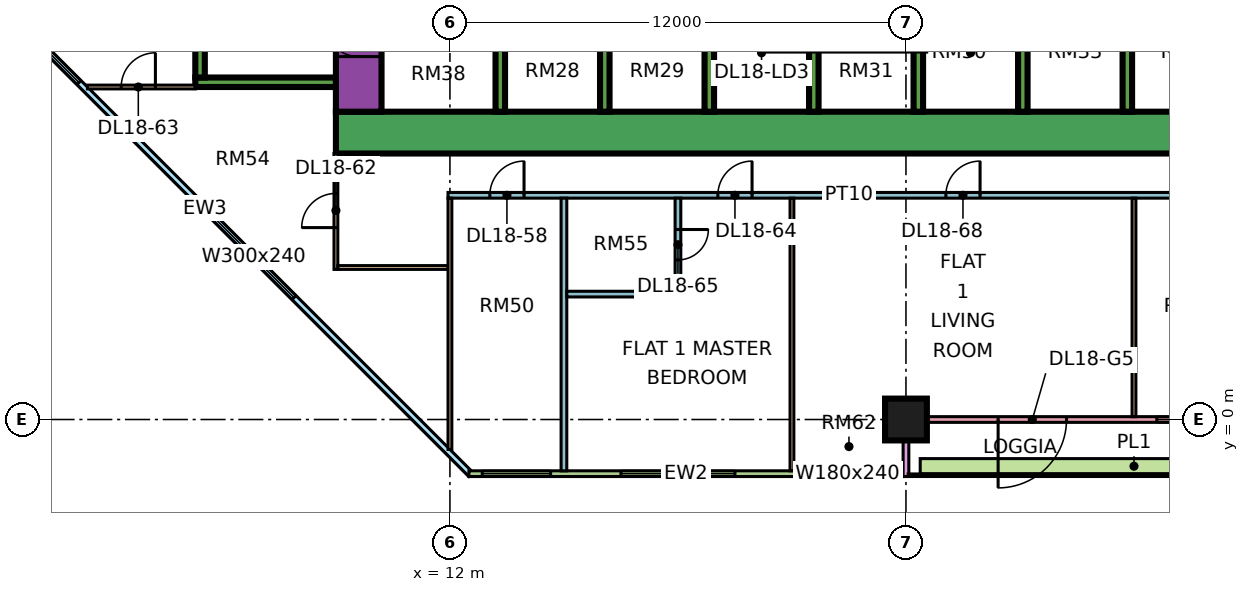
"""IFC4 building model, lengths in metres.
Left out: names, types, materials, properties, quantities, classifications, styles, units other than length and angle.
Written with IfcOpenShell. Run it as: python <this file> out.ifc"""

import sys

from ifc_helpers import new_model, si_unit, direction, frame, frame_2d, origin, origin_2d, place, context, subcontext, project, spatial, rectangle, extrude, element, fill, save


model = new_model("IFC4")
c1 = context("Model", 3, precision=1e-05, world=origin(), true_north=direction((0.0, 1.0)))
c2 = subcontext(c1, "Body", "Model", "MODEL_VIEW")
j1 = project(units=[si_unit("LENGTHUNIT", "METRE"), si_unit("PLANEANGLEUNIT", "RADIAN")], contexts=[c1])
p1 = place(None, origin())
s1 = spatial("IfcSite", under=j1, at=p1, CompositionType="ELEMENT")
p2 = place(p1, origin())
s2 = spatial("IfcBuilding", under=s1, at=p2, CompositionType="ELEMENT")
p3 = place(p2, frame((0.0, 0.0, 82.65)))
s3 = spatial("IfcBuildingStorey", under=s2, at=p3, CompositionType="ELEMENT", Elevation=82.65)
p4 = place(p3, frame((24.0, 0.0, 0.0), z_axis=(0.0, 0.0, 1.0), x_axis=(1.0, 0.0, 0.0)))
e1 = element("IfcColumn", 1, at=p4, inside=s3, PredefinedType="COLUMN", context=c2, shape_type="SweptSolid", body=[
    extrude(rectangle(XDim=1.1, YDim=1.1, at=origin_2d()), origin(), (0.0, 0.0, 1.0), 3.75),
])
p5 = place(p3, frame((9.0, 7.55, 0.0), z_axis=(0.0, 0.0, 1.0), x_axis=(1.0, 0.0, 0.0)))
e2 = element("IfcWall", 2, at=p5, inside=s3, PredefinedType="SHEAR", context=c2, shape_type="SweptSolid", body=[
    extrude(rectangle(XDim=25.0, YDim=1.1, at=frame_2d((12.5, 0.0))), origin(), (0.0, 0.0, 1.0), 3.75),
])
p6 = place(p3, frame((9.6, 8.1, 0.0), z_axis=(0.0, 0.0, 1.0), x_axis=(0.0, 1.0, 0.0)))
e3 = element("IfcWall", 3, at=p6, inside=s3, PredefinedType="SHEAR", context=c2, shape_type="SweptSolid", body=[
    extrude(rectangle(XDim=10.8, YDim=1.2, at=frame_2d((5.4, 0.0))), origin(), (0.0, 0.0, 1.0), 3.75),
])
p7 = place(p6, frame((3.775, 0.0, 0.0)))
e4 = element("IfcOpeningElement", 4, at=p7, cuts=e3, PredefinedType="OPENING", context=c2, shape_type="SweptSolid", body=[
    extrude(rectangle(XDim=1.1, YDim=2.2, at=frame_2d((0.55, 1.1))), frame((0.0, 0.61, 0.0), z_axis=(0.0, -1.0, 0.0), x_axis=(1.0, 0.0, 0.0)), (0.0, 0.0, 1.0), 1.22),
])
p8 = place(p6, frame((6.275, 0.0, 0.0)))
e5 = element("IfcOpeningElement", 5, at=p8, cuts=e3, PredefinedType="OPENING", context=c2, shape_type="SweptSolid", body=[
    extrude(rectangle(XDim=1.1, YDim=2.2, at=frame_2d((0.55, 1.1))), frame((0.0, 0.61, 0.0), z_axis=(0.0, -1.0, 0.0), x_axis=(1.0, 0.0, 0.0)), (0.0, 0.0, 1.0), 1.22),
])
p9 = place(p6, frame((8.95, 0.0, 0.0)))
e6 = element("IfcOpeningElement", 6, at=p9, cuts=e3, PredefinedType="OPENING", context=c2, shape_type="SweptSolid", body=[
    extrude(rectangle(XDim=1.1, YDim=2.2, at=frame_2d((0.55, 1.1))), frame((0.0, 0.61, 0.0), z_axis=(0.0, -1.0, 0.0), x_axis=(1.0, 0.0, 0.0)), (0.0, 0.0, 1.0), 1.22),
])
p10 = place(p6, frame((1.45, 0.0, 0.0)))
e7 = element("IfcOpeningElement", 7, at=p10, cuts=e3, PredefinedType="OPENING", context=c2, shape_type="SweptSolid", body=[
    extrude(rectangle(XDim=0.9, YDim=2.1, at=frame_2d((0.45, 1.05))), frame((0.0, 0.61, 0.0), z_axis=(0.0, -1.0, 0.0), x_axis=(1.0, 0.0, 0.0)), (0.0, 0.0, 1.0), 1.22),
])
p11 = place(p3, frame((13.325, 8.1, 0.0), z_axis=(0.0, 0.0, 1.0), x_axis=(0.0, 1.0, 0.0)))
e8 = element("IfcWall", 8, at=p11, inside=s3, PredefinedType="SHEAR", context=c2, shape_type="SweptSolid", body=[
    extrude(rectangle(XDim=10.8, YDim=0.25, at=frame_2d((5.4, 0.0))), origin(), (0.0, 0.0, 1.0), 3.75),
])
for number, where, z_axis, x_axis in (
    (9, (16.075, 8.1, 0.0), (0.0, 0.0, 1.0), (0.0, 1.0, 0.0)),
    (10, (18.825, 8.1, 0.0), (0.0, 0.0, 1.0), (0.0, 1.0, 0.0)),
    (11, (21.575, 8.1, 0.0), (0.0, 0.0, 1.0), (0.0, 1.0, 0.0)),
    (12, (24.325, 8.1, 0.0), (0.0, 0.0, 1.0), (0.0, 1.0, 0.0)),
    (13, (27.075, 8.1, 0.0), (0.0, 0.0, 1.0), (0.0, 1.0, 0.0)),
    (14, (29.825, 8.1, 0.0), (0.0, 0.0, 1.0), (0.0, 1.0, 0.0)),
):
    element("IfcWall", number, at=place(p3, frame(where, z_axis=z_axis, x_axis=x_axis)), inside=s3, PredefinedType="SHEAR", context=c2, shape_type="SweptSolid", body=[
        extrude(rectangle(XDim=3.1, YDim=0.25, at=frame_2d((1.55, 0.0))), origin(), (0.0, 0.0, 1.0), 3.75),
    ])
p12 = place(p3, frame((5.3, 8.875, 0.0), z_axis=(0.0, 0.0, 1.0), x_axis=(1.0, 0.0, 0.0)))
e15 = element("IfcWall", 15, at=p12, inside=s3, PredefinedType="SHEAR", context=c2, shape_type="SweptSolid", body=[
    extrude(rectangle(XDim=3.7, YDim=0.25, at=frame_2d((1.85, 0.0))), origin(), (0.0, 0.0, 1.0), 3.75),
])
p13 = place(p3, frame((5.425, 9.0, 0.0), z_axis=(0.0, 0.0, 1.0), x_axis=(0.0, 1.0, 0.0)))
e16 = element("IfcWall", 16, at=p13, inside=s3, PredefinedType="SHEAR", context=c2, shape_type="SweptSolid", body=[
    extrude(rectangle(XDim=4.0, YDim=0.25, at=frame_2d((2.0, 0.0))), origin(), (0.0, 0.0, 1.0), 3.75),
])
p14 = place(p3, frame((-1.447, 12.553, 0.0), z_axis=(0.0, 0.0, 1.0), x_axis=(0.707106781187, -0.707106781187, 0.0)))
e17 = element("IfcWall", 17, at=p14, inside=s3, PredefinedType="SOLIDWALL", context=c2, shape_type="SweptSolid", body=[
    extrude(rectangle(XDim=19.799, YDim=0.15, at=frame_2d((9.899, 0.0))), origin(), (0.0, 0.0, 1.0), 3.3),
])
p15 = place(p14, frame((2.212, 0.0, 0.45)))
e18 = element("IfcOpeningElement", 18, at=p15, cuts=e17, PredefinedType="OPENING", context=c2, shape_type="SweptSolid", body=[
    extrude(rectangle(XDim=3.0, YDim=2.4, at=frame_2d((1.5, 1.2))), frame((0.0, 0.085, 0.0), z_axis=(0.0, -1.0, 0.0), x_axis=(1.0, 0.0, 0.0)), (0.0, 0.0, 1.0), 0.17),
])
p16 = place(p14, frame((10.216, 0.0, 0.45)))
e19 = element("IfcOpeningElement", 19, at=p16, cuts=e17, PredefinedType="OPENING", context=c2, shape_type="SweptSolid", body=[
    extrude(rectangle(XDim=3.0, YDim=2.4, at=frame_2d((1.5, 1.2))), frame((0.0, 0.085, 0.0), z_axis=(0.0, -1.0, 0.0), x_axis=(1.0, 0.0, 0.0)), (0.0, 0.0, 1.0), 0.17),
])
p17 = place(p3, frame((12.5, -1.425, 0.0), z_axis=(0.0, 0.0, 1.0), x_axis=(1.0, 0.0, 0.0)))
e20 = element("IfcWall", 20, at=p17, inside=s3, PredefinedType="SOLIDWALL", context=c2, shape_type="SweptSolid", body=[
    extrude(rectangle(XDim=11.425, YDim=0.15, at=frame_2d((5.712, 0.0))), origin(), (0.0, 0.0, 1.0), 3.3),
])
p18 = place(p17, frame((0.35, 0.0, 0.45)))
e21 = element("IfcOpeningElement", 21, at=p18, cuts=e20, PredefinedType="OPENING", context=c2, shape_type="SweptSolid", body=[
    extrude(rectangle(XDim=1.8, YDim=2.4, at=frame_2d((0.9, 1.2))), frame((0.0, 0.085, 0.0), z_axis=(0.0, -1.0, 0.0), x_axis=(1.0, 0.0, 0.0)), (0.0, 0.0, 1.0), 0.17),
])
p19 = place(p17, frame((4.0, 0.0, 0.45)))
e22 = element("IfcOpeningElement", 22, at=p19, cuts=e20, PredefinedType="OPENING", context=c2, shape_type="SweptSolid", body=[
    extrude(rectangle(XDim=3.0, YDim=2.4, at=frame_2d((1.5, 1.2))), frame((0.0, 0.085, 0.0), z_axis=(0.0, -1.0, 0.0), x_axis=(1.0, 0.0, 0.0)), (0.0, 0.0, 1.0), 0.17),
])
p20 = place(p17, frame((9.062, 0.0, 0.45)))
e23 = element("IfcOpeningElement", 23, at=p20, cuts=e20, PredefinedType="OPENING", context=c2, shape_type="SweptSolid", body=[
    extrude(rectangle(XDim=1.8, YDim=2.4, at=frame_2d((0.9, 1.2))), frame((0.0, 0.085, 0.0), z_axis=(0.0, -1.0, 0.0), x_axis=(1.0, 0.0, 0.0)), (0.0, 0.0, 1.0), 0.17),
])
p21 = place(p3, frame((24.075, 0.0, 0.0), z_axis=(0.0, 0.0, 1.0), x_axis=(1.0, 0.0, 0.0)))
e24 = element("IfcWall", 24, at=p21, inside=s3, PredefinedType="SOLIDWALL", context=c2, shape_type="SweptSolid", body=[
    extrude(rectangle(XDim=11.85, YDim=0.15, at=frame_2d((5.925, 0.0))), origin(), (0.0, 0.0, 1.0), 3.3),
])
p22 = place(p21, frame((2.35, 0.0, 0.0)))
e25 = element("IfcOpeningElement", 25, at=p22, cuts=e24, PredefinedType="OPENING", context=c2, shape_type="SweptSolid", body=[
    extrude(rectangle(XDim=1.8, YDim=2.4, at=frame_2d((0.9, 1.2))), frame((0.0, 0.085, 0.0), z_axis=(0.0, -1.0, 0.0), x_axis=(1.0, 0.0, 0.0)), (0.0, 0.0, 1.0), 0.17),
])
p23 = place(p21, frame((6.525, 0.0, 0.45)))
e26 = element("IfcOpeningElement", 26, at=p23, cuts=e24, PredefinedType="OPENING", context=c2, shape_type="SweptSolid", body=[
    extrude(rectangle(XDim=1.8, YDim=2.4, at=frame_2d((0.9, 1.2))), frame((0.0, 0.085, 0.0), z_axis=(0.0, -1.0, 0.0), x_axis=(1.0, 0.0, 0.0)), (0.0, 0.0, 1.0), 0.17),
])
p24 = place(p21, frame((9.5, 0.0, 0.45)))
e27 = element("IfcOpeningElement", 27, at=p24, cuts=e24, PredefinedType="OPENING", context=c2, shape_type="SweptSolid", body=[
    extrude(rectangle(XDim=1.2, YDim=2.4, at=frame_2d((0.6, 1.2))), frame((0.0, 0.085, 0.0), z_axis=(0.0, -1.0, 0.0), x_axis=(1.0, 0.0, 0.0)), (0.0, 0.0, 1.0), 0.17),
])
p25 = place(p3, frame((24.0, -1.5, 0.0), z_axis=(0.0, 0.0, 1.0), x_axis=(0.0, 1.0, 0.0)))
e28 = element("IfcWall", 28, at=p25, inside=s3, PredefinedType="SOLIDWALL", context=c2, shape_type="SweptSolid", body=[
    extrude(rectangle(XDim=1.5, YDim=0.15, at=frame_2d((0.75, 0.0))), origin(), (0.0, 0.0, 1.0), 3.3),
])
p26 = place(p3, frame((24.375, -1.229, 0.0), z_axis=(0.0, 0.0, 1.0), x_axis=(1.0, 0.0, 0.0)))
e29 = element("IfcWall", 29, at=p26, inside=s3, PredefinedType="SOLIDWALL", context=c2, shape_type="SweptSolid", body=[
    extrude(rectangle(XDim=11.25, YDim=0.4, at=frame_2d((5.625, 0.0))), origin(), (0.0, 0.0, 1.0), 0.7),
])
p27 = place(p3, frame((2.461, 8.75, 0.0), z_axis=(0.0, 0.0, 1.0), x_axis=(1.0, 0.0, 0.0)))
e30 = element("IfcWall", 30, at=p27, inside=s3, PredefinedType="PARTITIONING", context=c2, shape_type="SweptSolid", body=[
    extrude(rectangle(XDim=2.839, YDim=0.1, at=frame_2d((1.419, 0.0))), origin(), (0.0, 0.0, 1.0), 3.3),
])
p28 = place(p27, frame((0.889, 0.0, 0.0)))
e31 = element("IfcOpeningElement", 31, at=p28, cuts=e30, PredefinedType="OPENING", context=c2, shape_type="SweptSolid", body=[
    extrude(rectangle(XDim=0.9, YDim=2.1, at=frame_2d((0.45, 1.05))), frame((0.0, 0.06, 0.0), z_axis=(0.0, -1.0, 0.0), x_axis=(1.0, 0.0, 0.0)), (0.0, 0.0, 1.0), 0.12),
])
p29 = place(p3, frame((9.0, 3.95, 0.0), z_axis=(0.0, 0.0, 1.0), x_axis=(0.0, 1.0, 0.0)))
e32 = element("IfcWall", 32, at=p29, inside=s3, PredefinedType="PARTITIONING", context=c2, shape_type="SweptSolid", body=[
    extrude(rectangle(XDim=3.05, YDim=0.1, at=frame_2d((1.525, 0.0))), origin(), (0.0, 0.0, 1.0), 3.3),
])
p30 = place(p29, frame((1.1, 0.0, 0.0)))
e33 = element("IfcOpeningElement", 33, at=p30, cuts=e32, PredefinedType="OPENING", context=c2, shape_type="SweptSolid", body=[
    extrude(rectangle(XDim=0.9, YDim=2.1, at=frame_2d((0.45, 1.05))), frame((0.0, 0.06, 0.0), z_axis=(0.0, -1.0, 0.0), x_axis=(1.0, 0.0, 0.0)), (0.0, 0.0, 1.0), 0.12),
])
p31 = place(p3, frame((9.05, 4.0, 0.0), z_axis=(0.0, 0.0, 1.0), x_axis=(1.0, 0.0, 0.0)))
e34 = element("IfcWall", 34, at=p31, inside=s3, PredefinedType="PARTITIONING", context=c2, shape_type="SweptSolid", body=[
    extrude(rectangle(XDim=2.9, YDim=0.1, at=frame_2d((1.45, 0.0))), origin(), (0.0, 0.0, 1.0), 3.3),
])
p32 = place(p3, frame((11.95, 5.9, 0.0), z_axis=(0.0, 0.0, 1.0), x_axis=(1.0, 0.0, 0.0)))
e35 = element("IfcWall", 35, at=p32, inside=s3, PredefinedType="PARTITIONING", context=c2, shape_type="SweptSolid", body=[
    extrude(rectangle(XDim=21.1, YDim=0.15, at=frame_2d((10.55, 0.0))), origin(), (0.0, 0.0, 1.0), 3.3),
])
p33 = place(p32, frame((1.1, 0.0, 0.0)))
e36 = element("IfcOpeningElement", 36, at=p33, cuts=e35, PredefinedType="OPENING", context=c2, shape_type="SweptSolid", body=[
    extrude(rectangle(XDim=0.9, YDim=2.1, at=frame_2d((0.45, 1.05))), frame((0.0, 0.085, 0.0), z_axis=(0.0, -1.0, 0.0), x_axis=(1.0, 0.0, 0.0)), (0.0, 0.0, 1.0), 0.17),
])
p34 = place(p32, frame((7.1, 0.0, 0.0)))
e37 = element("IfcOpeningElement", 37, at=p34, cuts=e35, PredefinedType="OPENING", context=c2, shape_type="SweptSolid", body=[
    extrude(rectangle(XDim=0.9, YDim=2.1, at=frame_2d((0.45, 1.05))), frame((0.0, 0.085, 0.0), z_axis=(0.0, -1.0, 0.0), x_axis=(1.0, 0.0, 0.0)), (0.0, 0.0, 1.0), 0.17),
])
p35 = place(p32, frame((13.1, 0.0, 0.0)))
e38 = element("IfcOpeningElement", 38, at=p35, cuts=e35, PredefinedType="OPENING", context=c2, shape_type="SweptSolid", body=[
    extrude(rectangle(XDim=0.9, YDim=2.1, at=frame_2d((0.45, 1.05))), frame((0.0, 0.085, 0.0), z_axis=(0.0, -1.0, 0.0), x_axis=(1.0, 0.0, 0.0)), (0.0, 0.0, 1.0), 0.17),
])
p36 = place(p3, frame((12.0, -0.788, 0.0), z_axis=(0.0, 0.0, 1.0), x_axis=(0.0, 1.0, 0.0)))
e39 = element("IfcWall", 39, at=p36, inside=s3, PredefinedType="PARTITIONING", context=c2, shape_type="SweptSolid", body=[
    extrude(rectangle(XDim=6.613, YDim=0.1, at=frame_2d((3.306, 0.0))), origin(), (0.0, 0.0, 1.0), 3.3),
])
p37 = place(p3, frame((15.0, -1.351, 0.0), z_axis=(0.0, 0.0, 1.0), x_axis=(0.0, 1.0, 0.0)))
e40 = element("IfcWall", 40, at=p37, inside=s3, PredefinedType="PARTITIONING", context=c2, shape_type="SweptSolid", body=[
    extrude(rectangle(XDim=7.176, YDim=0.15, at=frame_2d((3.588, 0.0))), origin(), (0.0, 0.0, 1.0), 3.3),
])
p38 = place(p3, frame((15.075, 3.3, 0.0), z_axis=(0.0, 0.0, 1.0), x_axis=(1.0, 0.0, 0.0)))
e41 = element("IfcWall", 41, at=p38, inside=s3, PredefinedType="PARTITIONING", context=c2, shape_type="SweptSolid", body=[
    extrude(rectangle(XDim=3.0, YDim=0.15, at=frame_2d((1.5, 0.0))), origin(), (0.0, 0.0, 1.0), 3.3),
])
p39 = place(p3, frame((18.0, 3.375, 0.0), z_axis=(0.0, 0.0, 1.0), x_axis=(0.0, 1.0, 0.0)))
e42 = element("IfcWall", 42, at=p39, inside=s3, PredefinedType="PARTITIONING", context=c2, shape_type="SweptSolid", body=[
    extrude(rectangle(XDim=2.45, YDim=0.15, at=frame_2d((1.225, 0.0))), origin(), (0.0, 0.0, 1.0), 3.3),
])
p40 = place(p39, frame((0.825, 0.0, 0.0)))
e43 = element("IfcOpeningElement", 43, at=p40, cuts=e42, PredefinedType="OPENING", context=c2, shape_type="SweptSolid", body=[
    extrude(rectangle(XDim=0.8, YDim=2.1, at=frame_2d((0.4, 1.05))), frame((0.0, 0.085, 0.0), z_axis=(0.0, -1.0, 0.0), x_axis=(1.0, 0.0, 0.0)), (0.0, 0.0, 1.0), 0.17),
])
p41 = place(p3, frame((21.0, -1.35, 0.0), z_axis=(0.0, 0.0, 1.0), x_axis=(0.0, 1.0, 0.0)))
e44 = element("IfcWall", 44, at=p41, inside=s3, PredefinedType="PARTITIONING", context=c2, shape_type="SweptSolid", body=[
    extrude(rectangle(XDim=7.175, YDim=0.1, at=frame_2d((3.587, 0.0))), origin(), (0.0, 0.0, 1.0), 3.3),
])
p42 = place(p3, frame((30.0, 0.074, 0.0), z_axis=(0.0, 0.0, 1.0), x_axis=(0.0, 1.0, 0.0)))
e45 = element("IfcWall", 45, at=p42, inside=s3, PredefinedType="PARTITIONING", context=c2, shape_type="SweptSolid", body=[
    extrude(rectangle(XDim=5.751, YDim=0.1, at=frame_2d((2.875, 0.0))), origin(), (0.0, 0.0, 1.0), 3.3),
])
p43 = place(p15, origin())
e46 = element("IfcWindow", 46, at=p43, inside=s3, PartitioningType="SINGLE_PANEL", PredefinedType="WINDOW", context=c2, shape_type="SweptSolid", body=[
    extrude(rectangle(XDim=3.0, YDim=2.4, at=frame_2d((1.5, 1.2))), frame((0.0, 0.03, 0.0), z_axis=(0.0, -1.0, 0.0), x_axis=(1.0, 0.0, 0.0)), (0.0, 0.0, 1.0), 0.06),
])
fill(e18, e46)
p44 = place(p16, origin())
e47 = element("IfcWindow", 47, at=p44, inside=s3, PartitioningType="SINGLE_PANEL", PredefinedType="WINDOW", context=c2, shape_type="SweptSolid", body=[
    extrude(rectangle(XDim=3.0, YDim=2.4, at=frame_2d((1.5, 1.2))), frame((0.0, 0.03, 0.0), z_axis=(0.0, -1.0, 0.0), x_axis=(1.0, 0.0, 0.0)), (0.0, 0.0, 1.0), 0.06),
])
fill(e19, e47)
p45 = place(p18, origin())
e48 = element("IfcWindow", 48, at=p45, inside=s3, PartitioningType="SINGLE_PANEL", PredefinedType="WINDOW", context=c2, shape_type="SweptSolid", body=[
    extrude(rectangle(XDim=1.8, YDim=2.4, at=frame_2d((0.9, 1.2))), frame((0.0, 0.03, 0.0), z_axis=(0.0, -1.0, 0.0), x_axis=(1.0, 0.0, 0.0)), (0.0, 0.0, 1.0), 0.06),
])
fill(e21, e48)
p46 = place(p19, origin())
e49 = element("IfcWindow", 49, at=p46, inside=s3, PartitioningType="SINGLE_PANEL", PredefinedType="WINDOW", context=c2, shape_type="SweptSolid", body=[
    extrude(rectangle(XDim=3.0, YDim=2.4, at=frame_2d((1.5, 1.2))), frame((0.0, 0.03, 0.0), z_axis=(0.0, -1.0, 0.0), x_axis=(1.0, 0.0, 0.0)), (0.0, 0.0, 1.0), 0.06),
])
fill(e22, e49)
p47 = place(p20, origin())
e50 = element("IfcWindow", 50, at=p47, inside=s3, PartitioningType="SINGLE_PANEL", PredefinedType="WINDOW", context=c2, shape_type="SweptSolid", body=[
    extrude(rectangle(XDim=1.8, YDim=2.4, at=frame_2d((0.9, 1.2))), frame((0.0, 0.03, 0.0), z_axis=(0.0, -1.0, 0.0), x_axis=(1.0, 0.0, 0.0)), (0.0, 0.0, 1.0), 0.06),
])
fill(e23, e50)
p48 = place(p22, frame((1.8, 0.0, 0.0), z_axis=(0.0, 0.0, 1.0), x_axis=(-1.0, 0.0, 0.0)))
e51 = element("IfcDoor", 51, at=p48, inside=s3, OperationType="DOUBLE_DOOR_SINGLE_SWING", PredefinedType="DOOR", context=c2, shape_type="SweptSolid", body=[
    extrude(rectangle(XDim=1.8, YDim=2.4, at=frame_2d((0.9, 1.2))), frame((0.0, 0.025, 0.0), z_axis=(0.0, -1.0, 0.0), x_axis=(1.0, 0.0, 0.0)), (0.0, 0.0, 1.0), 0.05),
])
fill(e25, e51)
p49 = place(p23, origin())
e52 = element("IfcWindow", 52, at=p49, inside=s3, PartitioningType="SINGLE_PANEL", PredefinedType="WINDOW", context=c2, shape_type="SweptSolid", body=[
    extrude(rectangle(XDim=1.8, YDim=2.4, at=frame_2d((0.9, 1.2))), frame((0.0, 0.03, 0.0), z_axis=(0.0, -1.0, 0.0), x_axis=(1.0, 0.0, 0.0)), (0.0, 0.0, 1.0), 0.06),
])
fill(e26, e52)
p50 = place(p10, frame((0.9, 0.0, 0.0), z_axis=(0.0, 0.0, 1.0), x_axis=(-1.0, 0.0, 0.0)))
e53 = element("IfcDoor", 53, at=p50, inside=s3, OperationType="SINGLE_SWING_RIGHT", PredefinedType="DOOR", context=c2, shape_type="SweptSolid", body=[
    extrude(rectangle(XDim=0.9, YDim=2.1, at=frame_2d((0.45, 1.05))), frame((0.0, 0.025, 0.0), z_axis=(0.0, -1.0, 0.0), x_axis=(1.0, 0.0, 0.0)), (0.0, 0.0, 1.0), 0.05),
])
fill(e7, e53)
p51 = place(p33, frame((0.9, 0.0, 0.0), z_axis=(0.0, 0.0, 1.0), x_axis=(-1.0, 0.0, 0.0)))
e54 = element("IfcDoor", 54, at=p51, inside=s3, OperationType="SINGLE_SWING_RIGHT", PredefinedType="DOOR", context=c2, shape_type="SweptSolid", body=[
    extrude(rectangle(XDim=0.9, YDim=2.1, at=frame_2d((0.45, 1.05))), frame((0.0, 0.025, 0.0), z_axis=(0.0, -1.0, 0.0), x_axis=(1.0, 0.0, 0.0)), (0.0, 0.0, 1.0), 0.05),
])
fill(e36, e54)
p52 = place(p30, origin())
e55 = element("IfcDoor", 55, at=p52, inside=s3, OperationType="SINGLE_SWING_LEFT", PredefinedType="DOOR", context=c2, shape_type="SweptSolid", body=[
    extrude(rectangle(XDim=0.9, YDim=2.1, at=frame_2d((0.45, 1.05))), frame((0.0, 0.025, 0.0), z_axis=(0.0, -1.0, 0.0), x_axis=(1.0, 0.0, 0.0)), (0.0, 0.0, 1.0), 0.05),
])
fill(e33, e55)
p53 = place(p28, frame((0.9, 0.0, 0.0), z_axis=(0.0, 0.0, 1.0), x_axis=(-1.0, 0.0, 0.0)))
e56 = element("IfcDoor", 56, at=p53, inside=s3, OperationType="SINGLE_SWING_RIGHT", PredefinedType="DOOR", context=c2, shape_type="SweptSolid", body=[
    extrude(rectangle(XDim=0.9, YDim=2.1, at=frame_2d((0.45, 1.05))), frame((0.0, 0.025, 0.0), z_axis=(0.0, -1.0, 0.0), x_axis=(1.0, 0.0, 0.0)), (0.0, 0.0, 1.0), 0.05),
])
fill(e31, e56)
p54 = place(p34, frame((0.9, 0.0, 0.0), z_axis=(0.0, 0.0, 1.0), x_axis=(-1.0, 0.0, 0.0)))
e57 = element("IfcDoor", 57, at=p54, inside=s3, OperationType="SINGLE_SWING_RIGHT", PredefinedType="DOOR", context=c2, shape_type="SweptSolid", body=[
    extrude(rectangle(XDim=0.9, YDim=2.1, at=frame_2d((0.45, 1.05))), frame((0.0, 0.025, 0.0), z_axis=(0.0, -1.0, 0.0), x_axis=(1.0, 0.0, 0.0)), (0.0, 0.0, 1.0), 0.05),
])
fill(e37, e57)
p55 = place(p40, origin())
e58 = element("IfcDoor", 58, at=p55, inside=s3, OperationType="SINGLE_SWING_RIGHT", PredefinedType="DOOR", context=c2, shape_type="SweptSolid", body=[
    extrude(rectangle(XDim=0.8, YDim=2.1, at=frame_2d((0.4, 1.05))), frame((0.0, 0.025, 0.0), z_axis=(0.0, -1.0, 0.0), x_axis=(1.0, 0.0, 0.0)), (0.0, 0.0, 1.0), 0.05),
])
fill(e43, e58)
p56 = place(p35, frame((0.9, 0.0, 0.0), z_axis=(0.0, 0.0, 1.0), x_axis=(-1.0, 0.0, 0.0)))
e59 = element("IfcDoor", 59, at=p56, inside=s3, OperationType="SINGLE_SWING_RIGHT", PredefinedType="DOOR", context=c2, shape_type="SweptSolid", body=[
    extrude(rectangle(XDim=0.9, YDim=2.1, at=frame_2d((0.45, 1.05))), frame((0.0, 0.025, 0.0), z_axis=(0.0, -1.0, 0.0), x_axis=(1.0, 0.0, 0.0)), (0.0, 0.0, 1.0), 0.05),
])
fill(e38, e59)
save(model, sys.argv[1])
